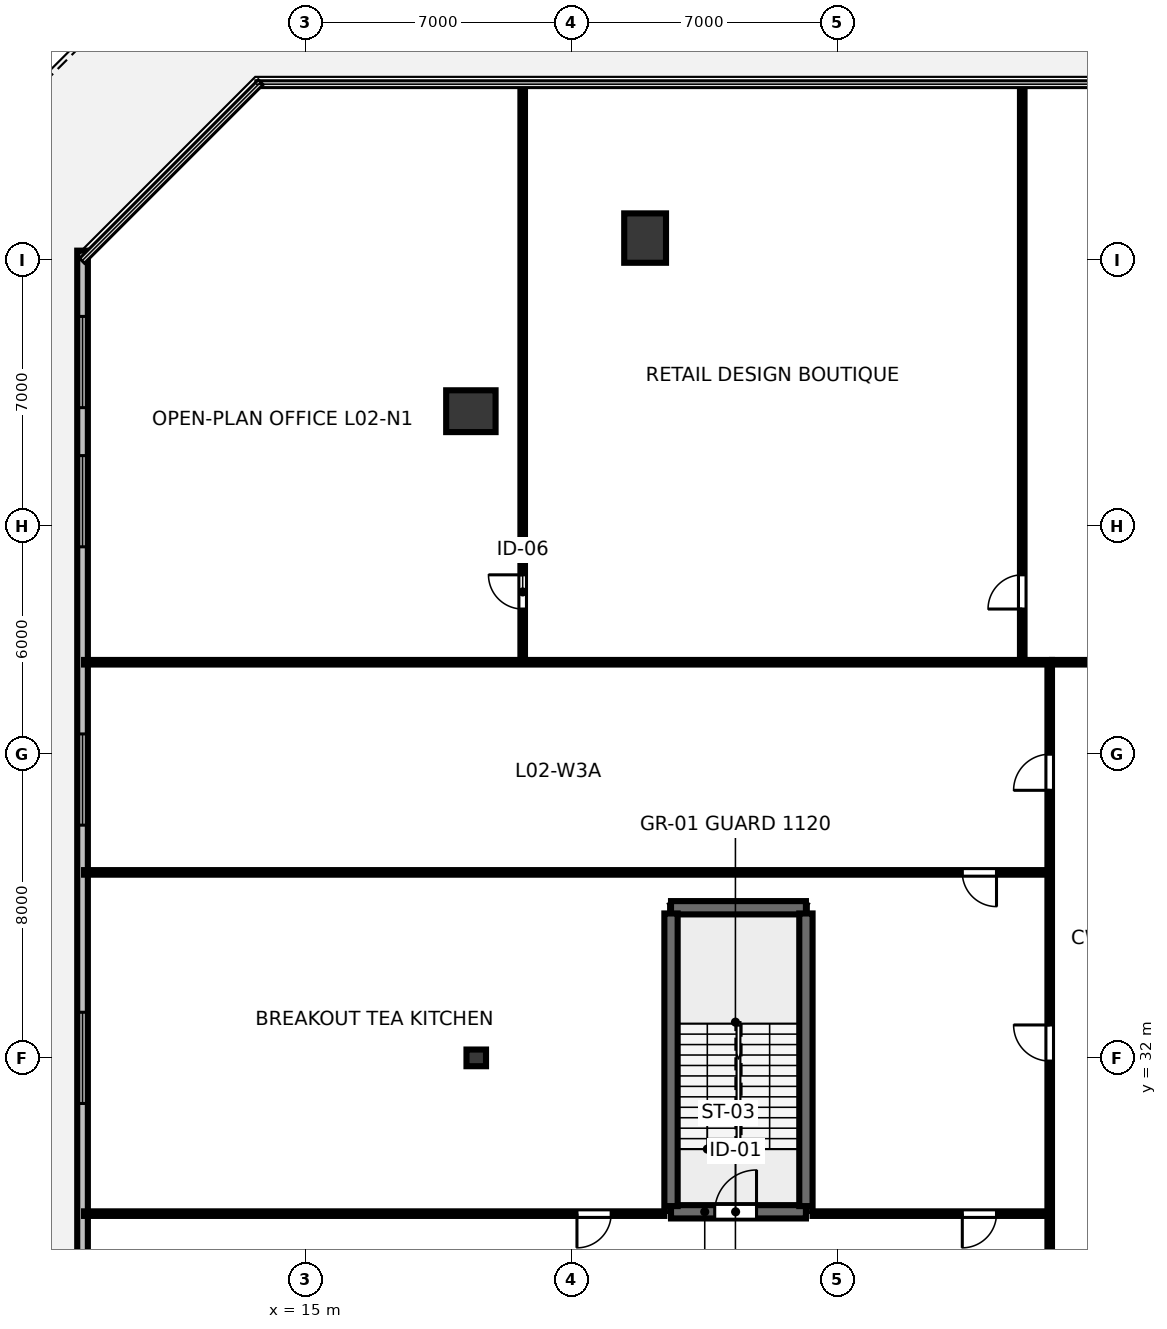
"""IFC4 building model, lengths in metres.
Left out: names, types, materials, properties, quantities, classifications, styles, units other than length and angle.
Written with IfcOpenShell. Run it as: python <this file> out.ifc"""

import sys

from ifc_helpers import new_model, si_unit, direction, frame, frame_2d, origin, origin_2d, place, context, subcontext, project, spatial, rectangle, hollow_rectangle, i_section, extrude, element, fill, save


model = new_model("IFC4")
c1 = context("Model", 3, precision=1e-05, world=origin(), true_north=direction((0.0, 1.0)))
c2 = subcontext(c1, "Body", "Model", "MODEL_VIEW")
j1 = project(units=[si_unit("LENGTHUNIT", "METRE"), si_unit("PLANEANGLEUNIT", "RADIAN")], contexts=[c1])
p1 = place(None, origin())
s1 = spatial("IfcSite", under=j1, at=p1, CompositionType="ELEMENT")
p2 = place(p1, origin())
s2 = spatial("IfcBuilding", under=s1, at=p2, CompositionType="ELEMENT")
p3 = place(p2, frame((0.0, 0.0, 9.5)))
s3 = spatial("IfcBuildingStorey", under=s2, at=p3, CompositionType="ELEMENT", Elevation=9.5)
for number, where, z_axis, x_axis in (
    (1, (23.943, 53.571, 0.0), (0.0, 0.0, 1.0), (1.0, 0.0, 0.0)),
    (2, (19.358, 49.016, 0.0), (0.0, 0.0, 1.0), (0.0, 1.0, 0.0)),
):
    element("IfcColumn", number, at=place(p3, frame(where, z_axis=z_axis, x_axis=x_axis)), inside=s3, PredefinedType="COLUMN", context=c2, shape_type="SweptSolid", body=[
        extrude(hollow_rectangle(XDim=1.1, YDim=1.3, WallThickness=0.07, at=origin_2d()), origin(), (0.0, 0.0, 1.0), 4.208),
    ])
p4 = place(p3, frame((19.5, 32.0, 0.0), z_axis=(0.0, 0.0, 1.0), x_axis=(0.0, 1.0, 0.0)))
e3 = element("IfcColumn", 3, at=p4, inside=s3, PredefinedType="COLUMN", context=c2, shape_type="SweptSolid", body=[
    extrude(i_section(OverallWidth=0.439, OverallDepth=0.514, WebThickness=0.06, FlangeThickness=0.097, FilletRadius=0.025, at=origin_2d()), origin(), (0.0, 0.0, 1.0), 4.208),
])
p5 = place(p3, frame((9.14, 53.24, 0.0), z_axis=(0.0, 0.0, 1.0), x_axis=(0.0, -1.0, 0.0)))
e4 = element("IfcWall", 4, at=p5, inside=s3, PredefinedType="STANDARD", context=c2, shape_type="SweptSolid", body=[
    extrude(rectangle(XDim=42.48, YDim=0.28, at=frame_2d((21.24, 0.0))), origin(), (0.0, 0.0, 1.0), 4.21),
])
p6 = place(p5, frame((27.49, 0.0, 0.0)))
e5 = element("IfcOpeningElement", 5, at=p6, cuts=e4, PredefinedType="OPENING", context=c2, shape_type="SweptSolid", body=[
    extrude(rectangle(XDim=1.6, YDim=2.15, at=frame_2d((0.8, 1.075))), frame((0.0, 0.15, 0.0), z_axis=(0.0, -1.0, 0.0), x_axis=(1.0, 0.0, 0.0)), (0.0, 0.0, 1.0), 0.3),
])
p7 = place(p5, frame((1.731, 0.0, 0.85)))
e6 = element("IfcOpeningElement", 6, at=p7, cuts=e4, PredefinedType="OPENING", context=c2, shape_type="SweptSolid", body=[
    extrude(rectangle(XDim=2.4, YDim=2.4, at=frame_2d((1.2, 1.2))), frame((0.0, 0.15, 0.0), z_axis=(0.0, -1.0, 0.0), x_axis=(1.0, 0.0, 0.0)), (0.0, 0.0, 1.0), 0.3),
])
p8 = place(p5, frame((5.393, 0.0, 0.85)))
e7 = element("IfcOpeningElement", 7, at=p8, cuts=e4, PredefinedType="OPENING", context=c2, shape_type="SweptSolid", body=[
    extrude(rectangle(XDim=2.4, YDim=2.4, at=frame_2d((1.2, 1.2))), frame((0.0, 0.15, 0.0), z_axis=(0.0, -1.0, 0.0), x_axis=(1.0, 0.0, 0.0)), (0.0, 0.0, 1.0), 0.3),
])
p9 = place(p5, frame((12.716, 0.0, 0.85)))
e8 = element("IfcOpeningElement", 8, at=p9, cuts=e4, PredefinedType="OPENING", context=c2, shape_type="SweptSolid", body=[
    extrude(rectangle(XDim=2.4, YDim=2.4, at=frame_2d((1.2, 1.2))), frame((0.0, 0.15, 0.0), z_axis=(0.0, -1.0, 0.0), x_axis=(1.0, 0.0, 0.0)), (0.0, 0.0, 1.0), 0.3),
])
p10 = place(p5, frame((20.04, 0.0, 0.85)))
e9 = element("IfcOpeningElement", 9, at=p10, cuts=e4, PredefinedType="OPENING", context=c2, shape_type="SweptSolid", body=[
    extrude(rectangle(XDim=2.4, YDim=2.4, at=frame_2d((1.2, 1.2))), frame((0.0, 0.15, 0.0), z_axis=(0.0, -1.0, 0.0), x_axis=(1.0, 0.0, 0.0)), (0.0, 0.0, 1.0), 0.3),
])
p11 = place(p5, frame((34.687, 0.0, 0.85)))
e10 = element("IfcOpeningElement", 10, at=p11, cuts=e4, PredefinedType="OPENING", context=c2, shape_type="SweptSolid", body=[
    extrude(rectangle(XDim=2.4, YDim=2.4, at=frame_2d((1.2, 1.2))), frame((0.0, 0.15, 0.0), z_axis=(0.0, -1.0, 0.0), x_axis=(1.0, 0.0, 0.0)), (0.0, 0.0, 1.0), 0.3),
])
p12 = place(p5, frame((38.349, 0.0, 0.85)))
e11 = element("IfcOpeningElement", 11, at=p12, cuts=e4, PredefinedType="OPENING", context=c2, shape_type="SweptSolid", body=[
    extrude(rectangle(XDim=2.4, YDim=2.4, at=frame_2d((1.2, 1.2))), frame((0.0, 0.15, 0.0), z_axis=(0.0, -1.0, 0.0), x_axis=(1.0, 0.0, 0.0)), (0.0, 0.0, 1.0), 0.3),
])
p13 = place(p3, frame((20.722, 42.41, 0.0), z_axis=(0.0, 0.0, 1.0), x_axis=(0.0, 1.0, 0.0)))
e12 = element("IfcWall", 12, at=p13, inside=s3, PredefinedType="PARTITIONING", context=c2, shape_type="SweptSolid", body=[
    extrude(rectangle(XDim=15.21, YDim=0.12, at=frame_2d((7.605, 0.0))), origin(), (0.0, 0.0, 1.0), 3.31),
])
p14 = place(p13, frame((1.4, 0.0, 0.0)))
e13 = element("IfcOpeningElement", 13, at=p14, cuts=e12, PredefinedType="OPENING", context=c2, shape_type="SweptSolid", body=[
    extrude(rectangle(XDim=0.9, YDim=2.15, at=frame_2d((0.45, 1.075))), frame((0.0, 0.07, 0.0), z_axis=(0.0, -1.0, 0.0), x_axis=(1.0, 0.0, 0.0)), (0.0, 0.0, 1.0), 0.14),
])
p15 = place(p3, frame((33.867, 42.41, 0.0), z_axis=(0.0, 0.0, 1.0), x_axis=(0.0, 1.0, 0.0)))
e14 = element("IfcWall", 14, at=p15, inside=s3, PredefinedType="PARTITIONING", context=c2, shape_type="SweptSolid", body=[
    extrude(rectangle(XDim=15.21, YDim=0.12, at=frame_2d((7.605, 0.0))), origin(), (0.0, 0.0, 1.0), 3.31),
])
p16 = place(p15, frame((1.4, 0.0, 0.0)))
e15 = element("IfcOpeningElement", 15, at=p16, cuts=e14, PredefinedType="OPENING", context=c2, shape_type="SweptSolid", body=[
    extrude(rectangle(XDim=0.9, YDim=2.15, at=frame_2d((0.45, 1.075))), frame((0.0, 0.07, 0.0), z_axis=(0.0, -1.0, 0.0), x_axis=(1.0, 0.0, 0.0)), (0.0, 0.0, 1.0), 0.14),
])
p17 = place(p3, frame((34.65, 42.41, 0.0), z_axis=(0.0, 0.0, 1.0), x_axis=(1.0, 0.0, 0.0)))
e16 = element("IfcWall", 16, at=p17, inside=s3, PredefinedType="PARTITIONING", context=c2, shape_type="SweptSolid", body=[
    extrude(rectangle(XDim=22.7, YDim=0.12, at=frame_2d((11.35, 0.0))), origin(), (0.0, 0.0, 1.0), 3.31),
])
p18 = place(p17, frame((10.607, 0.0, 0.0)))
e17 = element("IfcOpeningElement", 17, at=p18, cuts=e16, PredefinedType="OPENING", context=c2, shape_type="SweptSolid", body=[
    extrude(rectangle(XDim=0.95, YDim=2.15, at=frame_2d((0.475, 1.075))), frame((0.0, 0.07, 0.0), z_axis=(0.0, -1.0, 0.0), x_axis=(1.0, 0.0, 0.0)), (0.0, 0.0, 1.0), 0.14),
])
p19 = place(p3, frame((34.59, 27.902, 0.0), z_axis=(0.0, 0.0, 1.0), x_axis=(-1.0, 0.0, 0.0)))
e18 = element("IfcWall", 18, at=p19, inside=s3, PredefinedType="PARTITIONING", context=c2, shape_type="SweptSolid", body=[
    extrude(rectangle(XDim=6.24, YDim=0.12, at=frame_2d((3.12, 0.0))), origin(), (0.0, 0.0, 1.0), 3.31),
])
p20 = place(p19, frame((1.4, 0.0, 0.0)))
e19 = element("IfcOpeningElement", 19, at=p20, cuts=e18, PredefinedType="OPENING", context=c2, shape_type="SweptSolid", body=[
    extrude(rectangle(XDim=0.9, YDim=2.15, at=frame_2d((0.45, 1.075))), frame((0.0, 0.07, 0.0), z_axis=(0.0, -1.0, 0.0), x_axis=(1.0, 0.0, 0.0)), (0.0, 0.0, 1.0), 0.14),
])
p21 = place(p3, frame((24.45, 27.902, 0.0), z_axis=(0.0, 0.0, 1.0), x_axis=(-1.0, 0.0, 0.0)))
e20 = element("IfcWall", 20, at=p21, inside=s3, PredefinedType="PARTITIONING", context=c2, shape_type="SweptSolid", body=[
    extrude(rectangle(XDim=15.27, YDim=0.12, at=frame_2d((7.635, 0.0))), origin(), (0.0, 0.0, 1.0), 3.31),
])
p22 = place(p21, frame((1.4, 0.0, 0.0)))
e21 = element("IfcOpeningElement", 21, at=p22, cuts=e20, PredefinedType="OPENING", context=c2, shape_type="SweptSolid", body=[
    extrude(rectangle(XDim=0.9, YDim=2.15, at=frame_2d((0.45, 1.075))), frame((0.0, 0.07, 0.0), z_axis=(0.0, -1.0, 0.0), x_axis=(1.0, 0.0, 0.0)), (0.0, 0.0, 1.0), 0.14),
])
p23 = place(p3, frame((34.59, 36.88, 0.0), z_axis=(0.0, 0.0, 1.0), x_axis=(-1.0, 0.0, 0.0)))
e22 = element("IfcWall", 22, at=p23, inside=s3, PredefinedType="PARTITIONING", context=c2, shape_type="SweptSolid", body=[
    extrude(rectangle(XDim=25.41, YDim=0.12, at=frame_2d((12.705, 0.0))), origin(), (0.0, 0.0, 1.0), 3.31),
])
p24 = place(p23, frame((1.4, 0.0, 0.0)))
e23 = element("IfcOpeningElement", 23, at=p24, cuts=e22, PredefinedType="OPENING", context=c2, shape_type="SweptSolid", body=[
    extrude(rectangle(XDim=0.9, YDim=2.15, at=frame_2d((0.45, 1.075))), frame((0.0, 0.07, 0.0), z_axis=(0.0, -1.0, 0.0), x_axis=(1.0, 0.0, 0.0)), (0.0, 0.0, 1.0), 0.14),
])
p25 = place(p3, frame((34.59, 21.65, 0.0), z_axis=(0.0, 0.0, 1.0), x_axis=(0.0, 1.0, 0.0)))
e24 = element("IfcWall", 24, at=p25, inside=s3, PredefinedType="PARTITIONING", context=c2, shape_type="SweptSolid", body=[
    extrude(rectangle(XDim=20.7, YDim=0.12, at=frame_2d((10.35, 0.0))), origin(), (0.0, 0.0, 1.0), 3.31),
])
p26 = place(p25, frame((2.751, 0.0, 0.0)))
e25 = element("IfcOpeningElement", 25, at=p26, cuts=e24, PredefinedType="OPENING", context=c2, shape_type="SweptSolid", body=[
    extrude(rectangle(XDim=0.95, YDim=2.15, at=frame_2d((0.475, 1.075))), frame((0.0, 0.07, 0.0), z_axis=(0.0, -1.0, 0.0), x_axis=(1.0, 0.0, 0.0)), (0.0, 0.0, 1.0), 0.14),
])
p27 = place(p25, frame((10.266, 0.0, 0.0)))
e26 = element("IfcOpeningElement", 26, at=p27, cuts=e24, PredefinedType="OPENING", context=c2, shape_type="SweptSolid", body=[
    extrude(rectangle(XDim=0.95, YDim=2.15, at=frame_2d((0.475, 1.075))), frame((0.0, 0.07, 0.0), z_axis=(0.0, -1.0, 0.0), x_axis=(1.0, 0.0, 0.0)), (0.0, 0.0, 1.0), 0.14),
])
p28 = place(p25, frame((17.39, 0.0, 0.0)))
e27 = element("IfcOpeningElement", 27, at=p28, cuts=e24, PredefinedType="OPENING", context=c2, shape_type="SweptSolid", body=[
    extrude(rectangle(XDim=0.95, YDim=2.15, at=frame_2d((0.475, 1.075))), frame((0.0, 0.07, 0.0), z_axis=(0.0, -1.0, 0.0), x_axis=(1.0, 0.0, 0.0)), (0.0, 0.0, 1.0), 0.14),
])
p29 = place(p3, frame((34.65, 42.41, 0.0), z_axis=(0.0, 0.0, 1.0), x_axis=(-1.0, 0.0, 0.0)))
e28 = element("IfcWall", 28, at=p29, inside=s3, PredefinedType="PARTITIONING", context=c2, shape_type="SweptSolid", body=[
    extrude(rectangle(XDim=25.47, YDim=0.12, at=frame_2d((12.735, 0.0))), origin(), (0.0, 0.0, 1.0), 3.31),
])
p30 = place(p3, frame((24.625, 27.95, 0.0), z_axis=(0.0, 0.0, 1.0), x_axis=(1.0, 0.0, 0.0)))
e29 = element("IfcWall", 29, at=p30, inside=s3, PredefinedType="SHEAR", context=c2, shape_type="SweptSolid", body=[
    extrude(rectangle(XDim=3.55, YDim=0.35, at=frame_2d((1.775, 0.0))), origin(), (0.0, 0.0, 1.0), 4.5),
])
p31 = place(p30, frame((1.15, 0.0, 0.0)))
e30 = element("IfcOpeningElement", 30, at=p31, cuts=e29, PredefinedType="OPENING", context=c2, shape_type="SweptSolid", body=[
    extrude(rectangle(XDim=1.1, YDim=2.15, at=frame_2d((0.55, 1.075))), frame((0.0, 0.185, 0.0), z_axis=(0.0, -1.0, 0.0), x_axis=(1.0, 0.0, 0.0)), (0.0, 0.0, 1.0), 0.37),
])
p32 = place(p3, frame((24.625, 35.95, 0.0), z_axis=(0.0, 0.0, 1.0), x_axis=(1.0, 0.0, 0.0)))
e31 = element("IfcWall", 31, at=p32, inside=s3, PredefinedType="SHEAR", context=c2, shape_type="SweptSolid", body=[
    extrude(rectangle(XDim=3.55, YDim=0.35, at=frame_2d((1.775, 0.0))), origin(), (0.0, 0.0, 1.0), 4.5),
])
for number, where, z_axis, x_axis in (
    (32, (24.625, 28.1, 0.0), (0.0, 0.0, 1.0), (0.0, 1.0, 0.0)),
    (33, (28.175, 28.1, 0.0), (0.0, 0.0, 1.0), (0.0, 1.0, 0.0)),
):
    element("IfcWall", number, at=place(p3, frame(where, z_axis=z_axis, x_axis=x_axis)), inside=s3, PredefinedType="SHEAR", context=c2, shape_type="SweptSolid", body=[
        extrude(rectangle(XDim=7.7, YDim=0.35, at=frame_2d((3.85, 0.0))), origin(), (0.0, 0.0, 1.0), 4.5),
    ])
p33 = place(p7, origin())
e34 = element("IfcWindow", 34, at=p33, inside=s3, PartitioningType="SINGLE_PANEL", PredefinedType="WINDOW", context=c2, shape_type="SweptSolid", body=[
    extrude(rectangle(XDim=2.4, YDim=2.4, at=frame_2d((1.2, 1.2))), frame((0.0, 0.03, 0.0), z_axis=(0.0, -1.0, 0.0), x_axis=(1.0, 0.0, 0.0)), (0.0, 0.0, 1.0), 0.06),
])
fill(e6, e34)
p34 = place(p8, origin())
e35 = element("IfcWindow", 35, at=p34, inside=s3, PartitioningType="SINGLE_PANEL", PredefinedType="WINDOW", context=c2, shape_type="SweptSolid", body=[
    extrude(rectangle(XDim=2.4, YDim=2.4, at=frame_2d((1.2, 1.2))), frame((0.0, 0.03, 0.0), z_axis=(0.0, -1.0, 0.0), x_axis=(1.0, 0.0, 0.0)), (0.0, 0.0, 1.0), 0.06),
])
fill(e7, e35)
p35 = place(p9, origin())
e36 = element("IfcWindow", 36, at=p35, inside=s3, PartitioningType="SINGLE_PANEL", PredefinedType="WINDOW", context=c2, shape_type="SweptSolid", body=[
    extrude(rectangle(XDim=2.4, YDim=2.4, at=frame_2d((1.2, 1.2))), frame((0.0, 0.03, 0.0), z_axis=(0.0, -1.0, 0.0), x_axis=(1.0, 0.0, 0.0)), (0.0, 0.0, 1.0), 0.06),
])
fill(e8, e36)
p36 = place(p10, origin())
e37 = element("IfcWindow", 37, at=p36, inside=s3, PartitioningType="SINGLE_PANEL", PredefinedType="WINDOW", context=c2, shape_type="SweptSolid", body=[
    extrude(rectangle(XDim=2.4, YDim=2.4, at=frame_2d((1.2, 1.2))), frame((0.0, 0.03, 0.0), z_axis=(0.0, -1.0, 0.0), x_axis=(1.0, 0.0, 0.0)), (0.0, 0.0, 1.0), 0.06),
])
fill(e9, e37)
p37 = place(p14, origin())
e38 = element("IfcDoor", 38, at=p37, inside=s3, OperationType="SINGLE_SWING_RIGHT", PredefinedType="DOOR", context=c2, shape_type="SweptSolid", body=[
    extrude(rectangle(XDim=0.9, YDim=2.15, at=frame_2d((0.45, 1.075))), frame((0.0, 0.025, 0.0), z_axis=(0.0, -1.0, 0.0), x_axis=(1.0, 0.0, 0.0)), (0.0, 0.0, 1.0), 0.05),
])
fill(e13, e38)
p38 = place(p16, origin())
e39 = element("IfcDoor", 39, at=p38, inside=s3, OperationType="SINGLE_SWING_LEFT", PredefinedType="DOOR", context=c2, shape_type="SweptSolid", body=[
    extrude(rectangle(XDim=0.9, YDim=2.15, at=frame_2d((0.45, 1.075))), frame((0.0, 0.025, 0.0), z_axis=(0.0, -1.0, 0.0), x_axis=(1.0, 0.0, 0.0)), (0.0, 0.0, 1.0), 0.05),
])
fill(e15, e39)
p39 = place(p20, origin())
e40 = element("IfcDoor", 40, at=p39, inside=s3, OperationType="SINGLE_SWING_RIGHT", PredefinedType="DOOR", context=c2, shape_type="SweptSolid", body=[
    extrude(rectangle(XDim=0.9, YDim=2.15, at=frame_2d((0.45, 1.075))), frame((0.0, 0.025, 0.0), z_axis=(0.0, -1.0, 0.0), x_axis=(1.0, 0.0, 0.0)), (0.0, 0.0, 1.0), 0.05),
])
fill(e19, e40)
p40 = place(p22, origin())
e41 = element("IfcDoor", 41, at=p40, inside=s3, OperationType="SINGLE_SWING_RIGHT", PredefinedType="DOOR", context=c2, shape_type="SweptSolid", body=[
    extrude(rectangle(XDim=0.9, YDim=2.15, at=frame_2d((0.45, 1.075))), frame((0.0, 0.025, 0.0), z_axis=(0.0, -1.0, 0.0), x_axis=(1.0, 0.0, 0.0)), (0.0, 0.0, 1.0), 0.05),
])
fill(e21, e41)
p41 = place(p24, origin())
e42 = element("IfcDoor", 42, at=p41, inside=s3, OperationType="SINGLE_SWING_LEFT", PredefinedType="DOOR", context=c2, shape_type="SweptSolid", body=[
    extrude(rectangle(XDim=0.9, YDim=2.15, at=frame_2d((0.45, 1.075))), frame((0.0, 0.025, 0.0), z_axis=(0.0, -1.0, 0.0), x_axis=(1.0, 0.0, 0.0)), (0.0, 0.0, 1.0), 0.05),
])
fill(e23, e42)
p42 = place(p27, origin())
e43 = element("IfcDoor", 43, at=p42, inside=s3, OperationType="SINGLE_SWING_RIGHT", PredefinedType="DOOR", context=c2, shape_type="SweptSolid", body=[
    extrude(rectangle(XDim=0.95, YDim=2.15, at=frame_2d((0.475, 1.075))), frame((0.0, 0.025, 0.0), z_axis=(0.0, -1.0, 0.0), x_axis=(1.0, 0.0, 0.0)), (0.0, 0.0, 1.0), 0.05),
])
fill(e26, e43)
p43 = place(p28, origin())
e44 = element("IfcDoor", 44, at=p43, inside=s3, OperationType="SINGLE_SWING_LEFT", PredefinedType="DOOR", context=c2, shape_type="SweptSolid", body=[
    extrude(rectangle(XDim=0.95, YDim=2.15, at=frame_2d((0.475, 1.075))), frame((0.0, 0.025, 0.0), z_axis=(0.0, -1.0, 0.0), x_axis=(1.0, 0.0, 0.0)), (0.0, 0.0, 1.0), 0.05),
])
fill(e27, e44)
p44 = place(p31, origin())
e45 = element("IfcDoor", 45, at=p44, inside=s3, OperationType="SINGLE_SWING_RIGHT", PredefinedType="DOOR", context=c2, shape_type="SweptSolid", body=[
    extrude(rectangle(XDim=1.1, YDim=2.15, at=frame_2d((0.55, 1.075))), frame((0.0, 0.025, 0.0), z_axis=(0.0, -1.0, 0.0), x_axis=(1.0, 0.0, 0.0)), (0.0, 0.0, 1.0), 0.05),
])
fill(e30, e45)
save(model, sys.argv[1])
